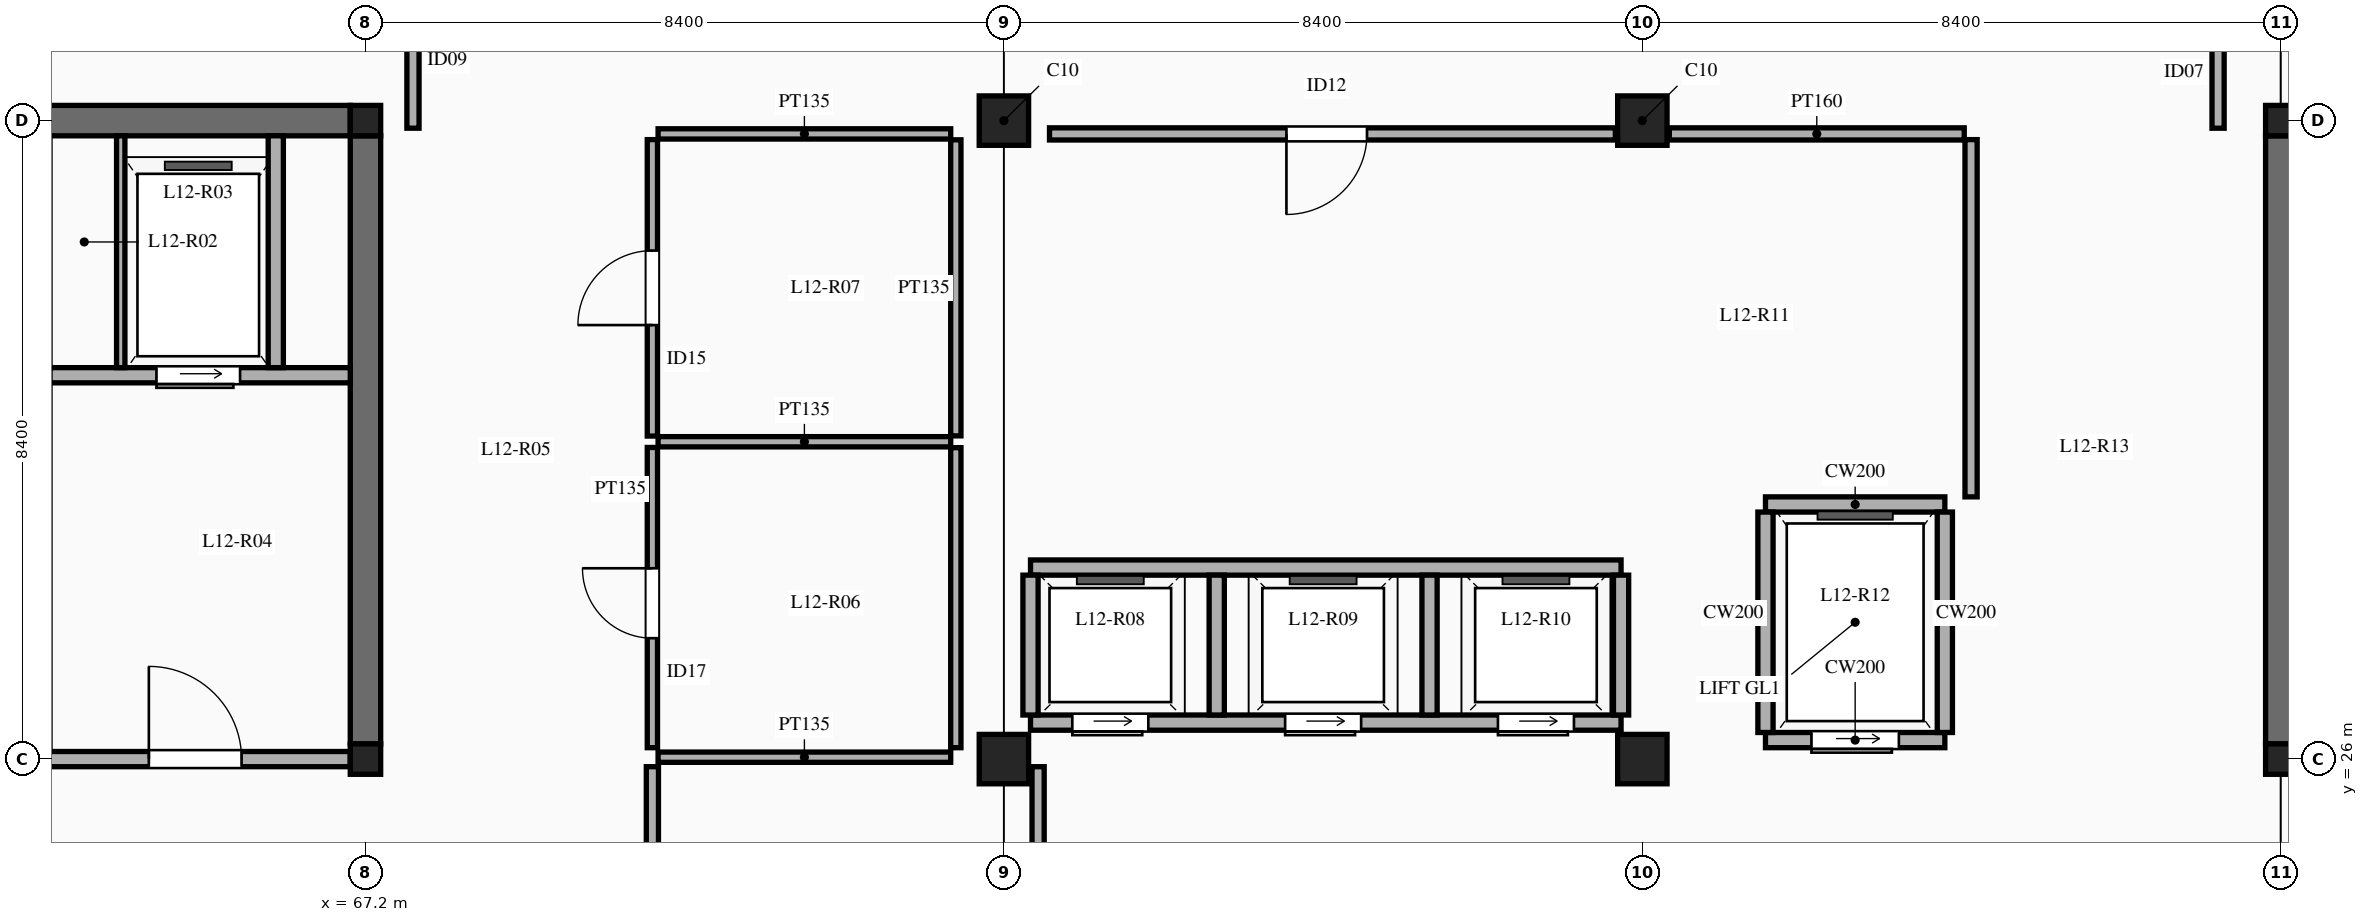
"""IFC4 building model, lengths in metres.
Left out: names, types, materials, properties, quantities, classifications, styles, units other than length and angle.
Written with IfcOpenShell. Run it as: python <this file> out.ifc"""

import sys

from ifc_helpers import new_model, si_unit, direction, frame, frame_2d, origin, origin_2d, place, context, subcontext, project, spatial, rectangle, extrude, element, fill, save


model = new_model("IFC4")
c1 = context("Model", 3, precision=1e-05, world=origin(), true_north=direction((0.0, 1.0)))
c2 = subcontext(c1, "Body", "Model", "MODEL_VIEW")
j1 = project(units=[si_unit("LENGTHUNIT", "METRE"), si_unit("PLANEANGLEUNIT", "RADIAN")], contexts=[c1])
p1 = place(None, origin())
s1 = spatial("IfcSite", under=j1, at=p1, CompositionType="ELEMENT")
p2 = place(p1, origin())
s2 = spatial("IfcBuilding", under=s1, at=p2, CompositionType="ELEMENT")
p3 = place(p2, frame((0.0, 0.0, 55.5)))
s3 = spatial("IfcBuildingStorey", under=s2, at=p3, CompositionType="ELEMENT", Elevation=55.5)
for number, where, z_axis, x_axis in (
    (1, (67.2, 26.0, 0.0), (0.0, 0.0, 1.0), (1.0, 0.0, 0.0)),
    (2, (67.2, 34.4, 0.0), (0.0, 0.0, 1.0), (1.0, 0.0, 0.0)),
):
    element("IfcColumn", number, at=place(p3, frame(where, z_axis=z_axis, x_axis=x_axis)), inside=s3, PredefinedType="COLUMN", context=c2, shape_type="SweptSolid", body=[
        extrude(rectangle(XDim=0.4, YDim=0.4, at=origin_2d()), origin(), (0.0, 0.0, 1.0), 4.5),
    ])
for number, where, z_axis, x_axis in (
    (3, (75.6, 26.0, 0.0), (0.0, 0.0, 1.0), (1.0, 0.0, 0.0)),
    (4, (75.6, 34.4, 0.0), (0.0, 0.0, 1.0), (1.0, 0.0, 0.0)),
    (5, (84.0, 26.0, 0.0), (0.0, 0.0, 1.0), (1.0, 0.0, 0.0)),
    (6, (84.0, 34.4, 0.0), (0.0, 0.0, 1.0), (1.0, 0.0, 0.0)),
):
    element("IfcColumn", number, at=place(p3, frame(where, z_axis=z_axis, x_axis=x_axis)), inside=s3, PredefinedType="COLUMN", context=c2, shape_type="SweptSolid", body=[
        extrude(rectangle(XDim=0.65, YDim=0.65, at=origin_2d()), origin(), (0.0, 0.0, 1.0), 4.5),
    ])
for number, where, z_axis, x_axis in (
    (7, (92.4, 26.0, 0.0), (0.0, 0.0, 1.0), (1.0, 0.0, 0.0)),
    (8, (92.4, 34.4, 0.0), (0.0, 0.0, 1.0), (1.0, 0.0, 0.0)),
):
    element("IfcColumn", number, at=place(p3, frame(where, z_axis=z_axis, x_axis=x_axis)), inside=s3, PredefinedType="COLUMN", context=c2, shape_type="SweptSolid", body=[
        extrude(rectangle(XDim=0.4, YDim=0.4, at=origin_2d()), origin(), (0.0, 0.0, 1.0), 4.5),
    ])
for number, where, z_axis, x_axis in (
    (9, (67.2, 26.2, 0.0), (0.0, 0.0, 1.0), (0.0, 1.0, 0.0)),
    (10, (59.0, 34.4, 0.0), (0.0, 0.0, 1.0), (1.0, 0.0, 0.0)),
    (11, (92.4, 26.2, 0.0), (0.0, 0.0, 1.0), (0.0, 1.0, 0.0)),
):
    element("IfcWall", number, at=place(p3, frame(where, z_axis=z_axis, x_axis=x_axis)), inside=s3, PredefinedType="SHEAR", context=c2, shape_type="SweptSolid", body=[
        extrude(rectangle(XDim=8.0, YDim=0.4, at=frame_2d((4.0, 0.0))), origin(), (0.0, 0.0, 1.0), 4.5),
    ])
p4 = place(p3, frame((59.0, 26.0, 0.0), z_axis=(0.0, 0.0, 1.0), x_axis=(1.0, 0.0, 0.0)))
e12 = element("IfcWall", 12, at=p4, inside=s3, PredefinedType="SOLIDWALL", context=c2, shape_type="SweptSolid", body=[
    extrude(rectangle(XDim=8.0, YDim=0.2, at=frame_2d((4.0, 0.0))), origin(), (0.0, 0.0, 1.0), 3.83),
])
p5 = place(p4, frame((1.55, 0.0, 0.0)))
e13 = element("IfcOpeningElement", 13, at=p5, cuts=e12, PredefinedType="OPENING", context=c2, shape_type="SweptSolid", body=[
    extrude(rectangle(XDim=1.15, YDim=2.15, at=frame_2d((0.575, 1.075))), frame((0.0, 0.11, 0.0), z_axis=(0.0, -1.0, 0.0), x_axis=(1.0, 0.0, 0.0)), (0.0, 0.0, 1.0), 0.22),
])
p6 = place(p4, frame((5.35, 0.0, 0.0)))
e14 = element("IfcOpeningElement", 14, at=p6, cuts=e12, PredefinedType="OPENING", context=c2, shape_type="SweptSolid", body=[
    extrude(rectangle(XDim=1.22, YDim=2.15, at=frame_2d((0.61, 1.075))), frame((0.0, 0.11, 0.0), z_axis=(0.0, -1.0, 0.0), x_axis=(1.0, 0.0, 0.0)), (0.0, 0.0, 1.0), 0.22),
])
p7 = place(p3, frame((63.05, 31.05, 0.0), z_axis=(0.0, 0.0, 1.0), x_axis=(1.0, 0.0, 0.0)))
e15 = element("IfcWall", 15, at=p7, inside=s3, PredefinedType="SOLIDWALL", context=c2, shape_type="SweptSolid", body=[
    extrude(rectangle(XDim=3.95, YDim=0.2, at=frame_2d((1.975, 0.0))), origin(), (0.0, 0.0, 1.0), 4.3),
])
p8 = place(p7, frame((1.4, 0.0, 0.0)))
e16 = element("IfcOpeningElement", 16, at=p8, cuts=e15, PredefinedType="OPENING", context=c2, shape_type="SweptSolid", body=[
    extrude(rectangle(XDim=1.1, YDim=2.15, at=frame_2d((0.55, 1.075))), frame((0.0, 0.11, 0.0), z_axis=(0.0, -1.0, 0.0), x_axis=(1.0, 0.0, 0.0)), (0.0, 0.0, 1.0), 0.22),
])
p9 = place(p3, frame((63.98, 31.15, 0.0), z_axis=(0.0, 0.0, 1.0), x_axis=(0.0, 1.0, 0.0)))
e17 = element("IfcWall", 17, at=p9, inside=s3, PredefinedType="PARTITIONING", context=c2, shape_type="SweptSolid", body=[
    extrude(rectangle(XDim=3.05, YDim=0.11, at=frame_2d((1.525, 0.0))), origin(), (0.0, 0.0, 1.0), 4.3),
])
p10 = place(p3, frame((66.02, 31.15, 0.0), z_axis=(0.0, 0.0, 1.0), x_axis=(0.0, 1.0, 0.0)))
e18 = element("IfcWall", 18, at=p10, inside=s3, PredefinedType="SOLIDWALL", context=c2, shape_type="SweptSolid", body=[
    extrude(rectangle(XDim=3.05, YDim=0.2, at=frame_2d((1.525, 0.0))), origin(), (0.0, 0.0, 1.0), 4.3),
])
p11 = place(p3, frame((75.95, 26.48, 0.0), z_axis=(0.0, 0.0, 1.0), x_axis=(1.0, 0.0, 0.0)))
e19 = element("IfcWall", 19, at=p11, inside=s3, PredefinedType="SOLIDWALL", context=c2, shape_type="SweptSolid", body=[
    extrude(rectangle(XDim=7.77, YDim=0.2, at=frame_2d((3.885, 0.0))), origin(), (0.0, 0.0, 1.0), 4.3),
])
p12 = place(p11, frame((0.55, 0.0, 0.0)))
e20 = element("IfcOpeningElement", 20, at=p12, cuts=e19, PredefinedType="OPENING", context=c2, shape_type="SweptSolid", body=[
    extrude(rectangle(XDim=1.0, YDim=2.15, at=frame_2d((0.5, 1.075))), frame((0.0, 0.11, 0.0), z_axis=(0.0, -1.0, 0.0), x_axis=(1.0, 0.0, 0.0)), (0.0, 0.0, 1.0), 0.22),
])
p13 = place(p11, frame((3.35, 0.0, 0.0)))
e21 = element("IfcOpeningElement", 21, at=p13, cuts=e19, PredefinedType="OPENING", context=c2, shape_type="SweptSolid", body=[
    extrude(rectangle(XDim=1.0, YDim=2.15, at=frame_2d((0.5, 1.075))), frame((0.0, 0.11, 0.0), z_axis=(0.0, -1.0, 0.0), x_axis=(1.0, 0.0, 0.0)), (0.0, 0.0, 1.0), 0.22),
])
p14 = place(p11, frame((6.15, 0.0, 0.0)))
e22 = element("IfcOpeningElement", 22, at=p14, cuts=e19, PredefinedType="OPENING", context=c2, shape_type="SweptSolid", body=[
    extrude(rectangle(XDim=1.0, YDim=2.15, at=frame_2d((0.5, 1.075))), frame((0.0, 0.11, 0.0), z_axis=(0.0, -1.0, 0.0), x_axis=(1.0, 0.0, 0.0)), (0.0, 0.0, 1.0), 0.22),
])
p15 = place(p3, frame((75.95, 28.52, 0.0), z_axis=(0.0, 0.0, 1.0), x_axis=(1.0, 0.0, 0.0)))
e23 = element("IfcWall", 23, at=p15, inside=s3, PredefinedType="SOLIDWALL", context=c2, shape_type="SweptSolid", body=[
    extrude(rectangle(XDim=7.77, YDim=0.2, at=frame_2d((3.885, 0.0))), origin(), (0.0, 0.0, 1.0), 4.3),
])
for number, where, z_axis, x_axis in (
    (24, (75.95, 26.58, 0.0), (0.0, 0.0, 1.0), (0.0, 1.0, 0.0)),
    (25, (78.4, 26.58, 0.0), (0.0, 0.0, 1.0), (0.0, 1.0, 0.0)),
    (26, (81.2, 26.58, 0.0), (0.0, 0.0, 1.0), (0.0, 1.0, 0.0)),
):
    element("IfcWall", number, at=place(p3, frame(where, z_axis=z_axis, x_axis=x_axis)), inside=s3, PredefinedType="SOLIDWALL", context=c2, shape_type="SweptSolid", body=[
        extrude(rectangle(XDim=1.84, YDim=0.2, at=frame_2d((0.92, 0.0))), origin(), (0.0, 0.0, 1.0), 4.3),
    ])
p16 = place(p3, frame((83.72, 26.58, 0.0), z_axis=(0.0, 0.0, 1.0), x_axis=(0.0, 1.0, 0.0)))
e27 = element("IfcWall", 27, at=p16, inside=s3, PredefinedType="SOLIDWALL", context=c2, shape_type="SweptSolid", body=[
    extrude(rectangle(XDim=1.84, YDim=0.2, at=frame_2d((0.92, 0.0))), origin(), (0.0, 0.0, 1.0), 3.88),
])
p17 = place(p3, frame((85.62, 26.25, 0.0), z_axis=(0.0, 0.0, 1.0), x_axis=(1.0, 0.0, 0.0)))
e28 = element("IfcWall", 28, at=p17, inside=s3, PredefinedType="SOLIDWALL", context=c2, shape_type="SweptSolid", body=[
    extrude(rectangle(XDim=2.36, YDim=0.2, at=frame_2d((1.18, 0.0))), origin(), (0.0, 0.0, 1.0), 3.83),
])
p18 = place(p17, frame((0.605, 0.0, 0.0)))
e29 = element("IfcOpeningElement", 29, at=p18, cuts=e28, PredefinedType="OPENING", context=c2, shape_type="SweptSolid", body=[
    extrude(rectangle(XDim=1.15, YDim=2.2, at=frame_2d((0.575, 1.1))), frame((0.0, 0.11, 0.0), z_axis=(0.0, -1.0, 0.0), x_axis=(1.0, 0.0, 0.0)), (0.0, 0.0, 1.0), 0.22),
])
p19 = place(p3, frame((85.62, 29.35, 0.0), z_axis=(0.0, 0.0, 1.0), x_axis=(1.0, 0.0, 0.0)))
e30 = element("IfcWall", 30, at=p19, inside=s3, PredefinedType="SOLIDWALL", context=c2, shape_type="SweptSolid", body=[
    extrude(rectangle(XDim=2.36, YDim=0.2, at=frame_2d((1.18, 0.0))), origin(), (0.0, 0.0, 1.0), 4.3),
])
p20 = place(p3, frame((85.62, 26.35, 0.0), z_axis=(0.0, 0.0, 1.0), x_axis=(0.0, 1.0, 0.0)))
e31 = element("IfcWall", 31, at=p20, inside=s3, PredefinedType="SOLIDWALL", context=c2, shape_type="SweptSolid", body=[
    extrude(rectangle(XDim=2.9, YDim=0.2, at=frame_2d((1.45, 0.0))), origin(), (0.0, 0.0, 1.0), 4.3),
])
p21 = place(p3, frame((87.98, 26.35, 0.0), z_axis=(0.0, 0.0, 1.0), x_axis=(0.0, 1.0, 0.0)))
e32 = element("IfcWall", 32, at=p21, inside=s3, PredefinedType="SOLIDWALL", context=c2, shape_type="SweptSolid", body=[
    extrude(rectangle(XDim=2.9, YDim=0.2, at=frame_2d((1.45, 0.0))), origin(), (0.0, 0.0, 1.0), 4.03),
])
p22 = place(p3, frame((70.975, 26.15, 0.0), z_axis=(0.0, 0.0, 1.0), x_axis=(0.0, 1.0, 0.0)))
e33 = element("IfcWall", 33, at=p22, inside=s3, PredefinedType="PARTITIONING", context=c2, shape_type="SweptSolid", body=[
    extrude(rectangle(XDim=3.95, YDim=0.135, at=frame_2d((1.975, 0.0))), origin(), (0.0, 0.0, 1.0), 3.45),
])
p23 = place(p22, frame((1.441, 0.0, 0.0)))
e34 = element("IfcOpeningElement", 34, at=p23, cuts=e33, PredefinedType="OPENING", context=c2, shape_type="SweptSolid", body=[
    extrude(rectangle(XDim=0.92, YDim=2.12, at=frame_2d((0.46, 1.06))), frame((0.0, 0.077, 0.0), z_axis=(0.0, -1.0, 0.0), x_axis=(1.0, 0.0, 0.0)), (0.0, 0.0, 1.0), 0.155),
])
p24 = place(p3, frame((70.975, 30.25, 0.0), z_axis=(0.0, 0.0, 1.0), x_axis=(0.0, 1.0, 0.0)))
e35 = element("IfcWall", 35, at=p24, inside=s3, PredefinedType="PARTITIONING", context=c2, shape_type="SweptSolid", body=[
    extrude(rectangle(XDim=3.9, YDim=0.135, at=frame_2d((1.95, 0.0))), origin(), (0.0, 0.0, 1.0), 3.45),
])
p25 = place(p24, frame((1.46, 0.0, 0.0)))
e36 = element("IfcOpeningElement", 36, at=p25, cuts=e35, PredefinedType="OPENING", context=c2, shape_type="SweptSolid", body=[
    extrude(rectangle(XDim=0.98, YDim=2.15, at=frame_2d((0.49, 1.075))), frame((0.0, 0.077, 0.0), z_axis=(0.0, -1.0, 0.0), x_axis=(1.0, 0.0, 0.0)), (0.0, 0.0, 1.0), 0.155),
])
for number, where, z_axis, x_axis in (
    (37, (71.05, 30.175, 0.0), (0.0, 0.0, 1.0), (1.0, 0.0, 0.0)),
    (38, (71.05, 26.025, 0.0), (0.0, 0.0, 1.0), (1.0, 0.0, 0.0)),
    (39, (71.05, 34.225, 0.0), (0.0, 0.0, 1.0), (1.0, 0.0, 0.0)),
):
    element("IfcWall", number, at=place(p3, frame(where, z_axis=z_axis, x_axis=x_axis)), inside=s3, PredefinedType="PARTITIONING", context=c2, shape_type="SweptSolid", body=[
        extrude(rectangle(XDim=3.85, YDim=0.135, at=frame_2d((1.925, 0.0))), origin(), (0.0, 0.0, 1.0), 3.45),
    ])
p26 = place(p3, frame((88.325, 29.45, 0.0), z_axis=(0.0, 0.0, 1.0), x_axis=(0.0, 1.0, 0.0)))
e40 = element("IfcWall", 40, at=p26, inside=s3, PredefinedType="PARTITIONING", context=c2, shape_type="SweptSolid", body=[
    extrude(rectangle(XDim=4.7, YDim=0.16, at=frame_2d((2.35, 0.0))), origin(), (0.0, 0.0, 1.0), 3.45),
])
p27 = place(p3, frame((76.2, 34.225, 0.0), z_axis=(0.0, 0.0, 1.0), x_axis=(1.0, 0.0, 0.0)))
e41 = element("IfcWall", 41, at=p27, inside=s3, PredefinedType="PARTITIONING", context=c2, shape_type="SweptSolid", body=[
    extrude(rectangle(XDim=7.445, YDim=0.16, at=frame_2d((3.723, 0.0))), origin(), (0.0, 0.0, 1.0), 3.45),
])
p28 = place(p27, frame((3.117, 0.0, 0.0)))
e42 = element("IfcOpeningElement", 42, at=p28, cuts=e41, PredefinedType="OPENING", context=c2, shape_type="SweptSolid", body=[
    extrude(rectangle(XDim=1.06, YDim=2.18, at=frame_2d((0.53, 1.09))), frame((0.0, 0.09, 0.0), z_axis=(0.0, -1.0, 0.0), x_axis=(1.0, 0.0, 0.0)), (0.0, 0.0, 1.0), 0.18),
])
p29 = place(p3, frame((84.355, 34.225, 0.0), z_axis=(0.0, 0.0, 1.0), x_axis=(1.0, 0.0, 0.0)))
e43 = element("IfcWall", 43, at=p29, inside=s3, PredefinedType="PARTITIONING", context=c2, shape_type="SweptSolid", body=[
    extrude(rectangle(XDim=3.88, YDim=0.16, at=frame_2d((1.94, 0.0))), origin(), (0.0, 0.0, 1.0), 3.45),
])
p30 = place(p3, frame((76.05, 21.3, 0.0), z_axis=(0.0, 0.0, 1.0), x_axis=(0.0, 1.0, 0.0)))
e44 = element("IfcWall", 44, at=p30, inside=s3, PredefinedType="PARTITIONING", context=c2, shape_type="SweptSolid", body=[
    extrude(rectangle(XDim=4.6, YDim=0.16, at=frame_2d((2.3, 0.0))), origin(), (0.0, 0.0, 1.0), 3.45),
])
p31 = place(p3, frame((70.975, 21.315, 0.0), z_axis=(0.0, 0.0, 1.0), x_axis=(0.0, 1.0, 0.0)))
e45 = element("IfcWall", 45, at=p31, inside=s3, PredefinedType="PARTITIONING", context=c2, shape_type="SweptSolid", body=[
    extrude(rectangle(XDim=4.585, YDim=0.16, at=frame_2d((2.292, 0.0))), origin(), (0.0, 0.0, 1.0), 3.45),
])
p32 = place(p3, frame((67.825, 34.3, 0.0), z_axis=(0.0, 0.0, 1.0), x_axis=(0.0, 1.0, 0.0)))
e46 = element("IfcWall", 46, at=p32, inside=s3, PredefinedType="PARTITIONING", context=c2, shape_type="SweptSolid", body=[
    extrude(rectangle(XDim=2.75, YDim=0.16, at=frame_2d((1.375, 0.0))), origin(), (0.0, 0.0, 1.0), 3.45),
])
p33 = place(p32, frame((1.34, 0.0, 0.0)))
e47 = element("IfcOpeningElement", 47, at=p33, cuts=e46, PredefinedType="OPENING", context=c2, shape_type="SweptSolid", body=[
    extrude(rectangle(XDim=1.16, YDim=2.2, at=frame_2d((0.58, 1.1))), frame((0.0, 0.09, 0.0), z_axis=(0.0, -1.0, 0.0), x_axis=(1.0, 0.0, 0.0)), (0.0, 0.0, 1.0), 0.18),
])
p34 = place(p3, frame((91.575, 34.3, 0.0), z_axis=(0.0, 0.0, 1.0), x_axis=(0.0, 1.0, 0.0)))
e48 = element("IfcWall", 48, at=p34, inside=s3, PredefinedType="PARTITIONING", context=c2, shape_type="SweptSolid", body=[
    extrude(rectangle(XDim=2.74, YDim=0.16, at=frame_2d((1.37, 0.0))), origin(), (0.0, 0.0, 1.0), 3.45),
])
p35 = place(p34, frame((1.19, 0.0, 0.0)))
e49 = element("IfcOpeningElement", 49, at=p35, cuts=e48, PredefinedType="OPENING", context=c2, shape_type="SweptSolid", body=[
    extrude(rectangle(XDim=1.3, YDim=2.25, at=frame_2d((0.65, 1.125))), frame((0.0, 0.09, 0.0), z_axis=(0.0, -1.0, 0.0), x_axis=(1.0, 0.0, 0.0)), (0.0, 0.0, 1.0), 0.18),
])
p36 = place(p3, frame((74.968, 26.15, 0.0), z_axis=(0.0, 0.0, 1.0), x_axis=(0.0, 1.0, 0.0)))
e50 = element("IfcWall", 50, at=p36, inside=s3, PredefinedType="PARTITIONING", context=c2, shape_type="SweptSolid", body=[
    extrude(rectangle(XDim=3.948, YDim=0.135, at=frame_2d((1.974, 0.0))), origin(), (0.0, 0.0, 1.0), 3.45),
])
p37 = place(p3, frame((74.968, 30.252, 0.0), z_axis=(0.0, 0.0, 1.0), x_axis=(0.0, 1.0, 0.0)))
e51 = element("IfcWall", 51, at=p37, inside=s3, PredefinedType="PARTITIONING", context=c2, shape_type="SweptSolid", body=[
    extrude(rectangle(XDim=3.895, YDim=0.135, at=frame_2d((1.948, 0.0))), origin(), (0.0, 0.0, 1.0), 3.45),
])
p38 = place(p6, origin())
e52 = element("IfcDoor", 52, at=p38, inside=s3, OperationType="SINGLE_SWING_LEFT", PredefinedType="DOOR", context=c2, shape_type="SweptSolid", body=[
    extrude(rectangle(XDim=1.22, YDim=2.15, at=frame_2d((0.61, 1.075))), frame((0.0, 0.025, 0.0), z_axis=(0.0, -1.0, 0.0), x_axis=(1.0, 0.0, 0.0)), (0.0, 0.0, 1.0), 0.05),
])
fill(e14, e52)
p39 = place(p8, frame((1.1, 0.0, 0.0), z_axis=(0.0, 0.0, 1.0), x_axis=(-1.0, 0.0, 0.0)))
e53 = element("IfcDoor", 53, at=p39, inside=s3, OperationType="SLIDING_TO_LEFT", PredefinedType="DOOR", context=c2, shape_type="SweptSolid", body=[
    extrude(rectangle(XDim=1.1, YDim=2.15, at=frame_2d((0.55, 1.075))), frame((0.0, 0.025, 0.0), z_axis=(0.0, -1.0, 0.0), x_axis=(1.0, 0.0, 0.0)), (0.0, 0.0, 1.0), 0.05),
])
fill(e16, e53)
p40 = place(p12, frame((1.0, 0.0, 0.0), z_axis=(0.0, 0.0, 1.0), x_axis=(-1.0, 0.0, 0.0)))
e54 = element("IfcDoor", 54, at=p40, inside=s3, OperationType="SLIDING_TO_LEFT", PredefinedType="DOOR", context=c2, shape_type="SweptSolid", body=[
    extrude(rectangle(XDim=1.0, YDim=2.15, at=frame_2d((0.5, 1.075))), frame((0.0, 0.025, 0.0), z_axis=(0.0, -1.0, 0.0), x_axis=(1.0, 0.0, 0.0)), (0.0, 0.0, 1.0), 0.05),
])
fill(e20, e54)
p41 = place(p13, frame((1.0, 0.0, 0.0), z_axis=(0.0, 0.0, 1.0), x_axis=(-1.0, 0.0, 0.0)))
e55 = element("IfcDoor", 55, at=p41, inside=s3, OperationType="SLIDING_TO_LEFT", PredefinedType="DOOR", context=c2, shape_type="SweptSolid", body=[
    extrude(rectangle(XDim=1.0, YDim=2.15, at=frame_2d((0.5, 1.075))), frame((0.0, 0.025, 0.0), z_axis=(0.0, -1.0, 0.0), x_axis=(1.0, 0.0, 0.0)), (0.0, 0.0, 1.0), 0.05),
])
fill(e21, e55)
p42 = place(p14, frame((1.0, 0.0, 0.0), z_axis=(0.0, 0.0, 1.0), x_axis=(-1.0, 0.0, 0.0)))
e56 = element("IfcDoor", 56, at=p42, inside=s3, OperationType="SLIDING_TO_LEFT", PredefinedType="DOOR", context=c2, shape_type="SweptSolid", body=[
    extrude(rectangle(XDim=1.0, YDim=2.15, at=frame_2d((0.5, 1.075))), frame((0.0, 0.025, 0.0), z_axis=(0.0, -1.0, 0.0), x_axis=(1.0, 0.0, 0.0)), (0.0, 0.0, 1.0), 0.05),
])
fill(e22, e56)
p43 = place(p18, frame((1.15, 0.0, 0.0), z_axis=(0.0, 0.0, 1.0), x_axis=(-1.0, 0.0, 0.0)))
e57 = element("IfcDoor", 57, at=p43, inside=s3, OperationType="SLIDING_TO_LEFT", PredefinedType="DOOR", context=c2, shape_type="SweptSolid", body=[
    extrude(rectangle(XDim=1.15, YDim=2.2, at=frame_2d((0.575, 1.1))), frame((0.0, 0.025, 0.0), z_axis=(0.0, -1.0, 0.0), x_axis=(1.0, 0.0, 0.0)), (0.0, 0.0, 1.0), 0.05),
])
fill(e29, e57)
p44 = place(p23, origin())
e58 = element("IfcDoor", 58, at=p44, inside=s3, OperationType="SINGLE_SWING_RIGHT", PredefinedType="DOOR", context=c2, shape_type="SweptSolid", body=[
    extrude(rectangle(XDim=0.92, YDim=2.12, at=frame_2d((0.46, 1.06))), frame((0.0, 0.025, 0.0), z_axis=(0.0, -1.0, 0.0), x_axis=(1.0, 0.0, 0.0)), (0.0, 0.0, 1.0), 0.05),
])
fill(e34, e58)
p45 = place(p25, origin())
e59 = element("IfcDoor", 59, at=p45, inside=s3, OperationType="SINGLE_SWING_LEFT", PredefinedType="DOOR", context=c2, shape_type="SweptSolid", body=[
    extrude(rectangle(XDim=0.98, YDim=2.15, at=frame_2d((0.49, 1.075))), frame((0.0, 0.025, 0.0), z_axis=(0.0, -1.0, 0.0), x_axis=(1.0, 0.0, 0.0)), (0.0, 0.0, 1.0), 0.05),
])
fill(e36, e59)
p46 = place(p28, frame((1.06, 0.0, 0.0), z_axis=(0.0, 0.0, 1.0), x_axis=(-1.0, 0.0, 0.0)))
e60 = element("IfcDoor", 60, at=p46, inside=s3, OperationType="SINGLE_SWING_RIGHT", PredefinedType="DOOR", context=c2, shape_type="SweptSolid", body=[
    extrude(rectangle(XDim=1.06, YDim=2.18, at=frame_2d((0.53, 1.09))), frame((0.0, 0.025, 0.0), z_axis=(0.0, -1.0, 0.0), x_axis=(1.0, 0.0, 0.0)), (0.0, 0.0, 1.0), 0.05),
])
fill(e42, e60)
save(model, sys.argv[1])
